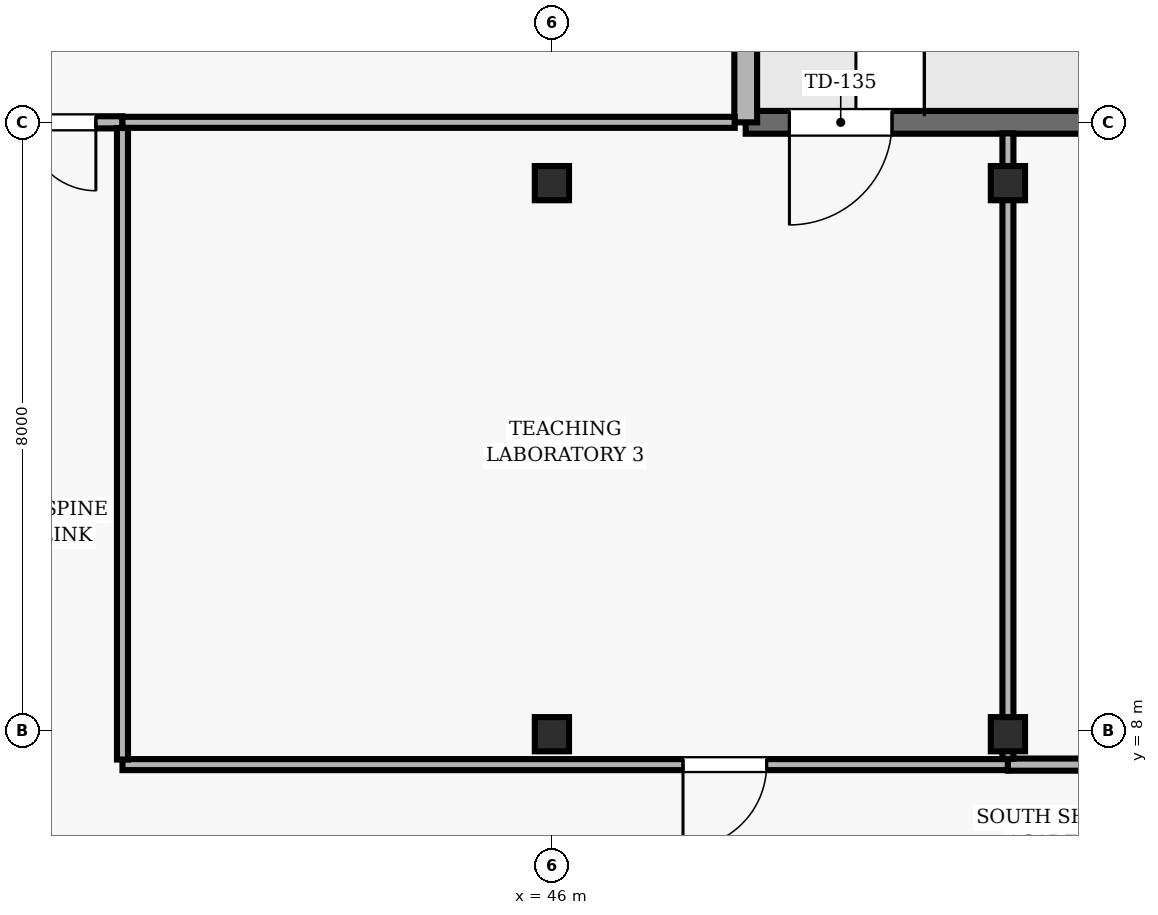
"""IFC4 building model, lengths in metres.
Left out: names, types, materials, properties, quantities, classifications, styles, units other than length and angle.
Written with IfcOpenShell. Run it as: python <this file> out.ifc"""

import sys

from ifc_helpers import new_model, si_unit, direction, frame, frame_2d, origin, origin_2d, place, context, subcontext, project, spatial, rectangle, hollow_rectangle, extrude, element, fill, save


model = new_model("IFC4")
c1 = context("Model", 3, precision=1e-05, world=origin(), true_north=direction((0.0, 1.0)))
c2 = subcontext(c1, "Body", "Model", "MODEL_VIEW")
j1 = project(units=[si_unit("LENGTHUNIT", "METRE"), si_unit("PLANEANGLEUNIT", "RADIAN")], contexts=[c1])
p1 = place(None, origin())
s1 = spatial("IfcSite", under=j1, at=p1, CompositionType="ELEMENT")
p2 = place(p1, origin())
s2 = spatial("IfcBuilding", under=s1, at=p2, CompositionType="ELEMENT")
p3 = place(p2, frame((0.0, 0.0, 187.5)))
s3 = spatial("IfcBuildingStorey", under=s2, at=p3, CompositionType="ELEMENT", Elevation=187.5)
for number, where, z_axis, x_axis in (
    (1, (46.0, 7.95, 0.0), (0.0, 0.0, 1.0), (1.0, 0.0, 0.0)),
    (2, (46.0, 15.2, 0.0), (0.0, 0.0, 1.0), (1.0, 0.0, 0.0)),
    (3, (52.0, 7.95, 0.0), (0.0, 0.0, 1.0), (1.0, 0.0, 0.0)),
    (4, (52.0, 15.2, 0.0), (0.0, 0.0, 1.0), (1.0, 0.0, 0.0)),
):
    element("IfcColumn", number, at=place(p3, frame(where, z_axis=z_axis, x_axis=x_axis)), inside=s3, PredefinedType="COLUMN", context=c2, shape_type="SweptSolid", body=[
        extrude(hollow_rectangle(XDim=0.45, YDim=0.45, WallThickness=0.02, at=origin_2d()), origin(), (0.0, 0.0, 1.0), 3.9),
    ])
p4 = place(p3, frame((62.7, 16.0, 0.0), z_axis=(0.0, 0.0, 1.0), x_axis=(-1.0, 0.0, 0.0)))
e5 = element("IfcWall", 5, at=p4, inside=s3, PredefinedType="SOLIDWALL", context=c2, shape_type="SweptSolid", body=[
    extrude(rectangle(XDim=14.15, YDim=0.3, at=frame_2d((7.075, 0.0))), origin(), (0.0, 0.0, 1.0), 3.69),
])
p5 = place(p4, frame((6.85, 0.0, 0.0)))
e6 = element("IfcOpeningElement", 6, at=p5, cuts=e5, PredefinedType="OPENING", context=c2, shape_type="SweptSolid", body=[
    extrude(rectangle(XDim=1.0, YDim=2.2, at=frame_2d((0.5, 1.1))), frame((0.0, 0.16, 0.0), z_axis=(0.0, -1.0, 0.0), x_axis=(1.0, 0.0, 0.0)), (0.0, 0.0, 1.0), 0.32),
])
p6 = place(p4, frame((12.225, 0.0, 0.0)))
e7 = element("IfcOpeningElement", 7, at=p6, cuts=e5, PredefinedType="OPENING", context=c2, shape_type="SweptSolid", body=[
    extrude(rectangle(XDim=1.35, YDim=2.2, at=frame_2d((0.675, 1.1))), frame((0.0, 0.16, 0.0), z_axis=(0.0, -1.0, 0.0), x_axis=(1.0, 0.0, 0.0)), (0.0, 0.0, 1.0), 0.32),
])
p7 = place(p4, frame((2.788, 0.0, 0.9)))
e8 = element("IfcOpeningElement", 8, at=p7, cuts=e5, PredefinedType="OPENING", context=c2, shape_type="SweptSolid", body=[
    extrude(rectangle(XDim=1.5, YDim=1.6, at=frame_2d((0.75, 0.8))), frame((0.0, 0.16, 0.0), z_axis=(0.0, -1.0, 0.0), x_axis=(1.0, 0.0, 0.0)), (0.0, 0.0, 1.0), 0.32),
])
p8 = place(p3, frame((48.55, 16.0, 0.0), z_axis=(0.0, 0.0, 1.0), x_axis=(0.0, 1.0, 0.0)))
e9 = element("IfcWall", 9, at=p8, inside=s3, PredefinedType="SOLIDWALL", context=c2, shape_type="SweptSolid", body=[
    extrude(rectangle(XDim=6.788, YDim=0.3, at=frame_2d((3.394, 0.0))), origin(), (0.0, 0.0, 1.0), 3.69),
])
p9 = place(p8, frame((2.494, 0.0, 0.9)))
e10 = element("IfcOpeningElement", 10, at=p9, cuts=e9, PredefinedType="OPENING", context=c2, shape_type="SweptSolid", body=[
    extrude(rectangle(XDim=1.8, YDim=1.6, at=frame_2d((0.9, 0.8))), frame((0.0, 0.16, 0.0), z_axis=(0.0, -1.0, 0.0), x_axis=(1.0, 0.0, 0.0)), (0.0, 0.0, 1.0), 0.32),
])
p10 = place(p3, frame((40.35, 16.0, 0.0), z_axis=(0.0, 0.0, 1.0), x_axis=(-1.0, 0.0, 0.0)))
e11 = element("IfcWall", 11, at=p10, inside=s3, PredefinedType="PARTITIONING", context=c2, shape_type="SweptSolid", body=[
    extrude(rectangle(XDim=2.3, YDim=0.16, at=frame_2d((1.15, 0.0))), origin(), (0.0, 0.0, 1.0), 3.69),
])
p11 = place(p10, frame((0.35, 0.0, 0.0)))
e12 = element("IfcOpeningElement", 12, at=p11, cuts=e11, PredefinedType="OPENING", context=c2, shape_type="SweptSolid", body=[
    extrude(rectangle(XDim=0.9, YDim=2.1, at=frame_2d((0.45, 1.05))), frame((0.0, 0.09, 0.0), z_axis=(0.0, -1.0, 0.0), x_axis=(1.0, 0.0, 0.0)), (0.0, 0.0, 1.0), 0.18),
])
p12 = place(p3, frame((40.35, 16.0, 0.0), z_axis=(0.0, 0.0, 1.0), x_axis=(1.0, 0.0, 0.0)))
e13 = element("IfcWall", 13, at=p12, inside=s3, PredefinedType="PARTITIONING", context=c2, shape_type="SweptSolid", body=[
    extrude(rectangle(XDim=8.055, YDim=0.145, at=frame_2d((4.027, 0.0))), origin(), (0.0, 0.0, 1.0), 3.39),
])
p13 = place(p3, frame((52.0, 7.55, 0.0), z_axis=(0.0, 0.0, 1.0), x_axis=(-1.0, 0.0, 0.0)))
e14 = element("IfcWall", 14, at=p13, inside=s3, PredefinedType="PARTITIONING", context=c2, shape_type="SweptSolid", body=[
    extrude(rectangle(XDim=11.65, YDim=0.145, at=frame_2d((5.825, 0.0))), origin(), (0.0, 0.0, 1.0), 3.146),
])
p14 = place(p13, frame((3.175, 0.0, 0.0)))
e15 = element("IfcOpeningElement", 15, at=p14, cuts=e14, PredefinedType="OPENING", context=c2, shape_type="SweptSolid", body=[
    extrude(rectangle(XDim=1.1, YDim=2.15, at=frame_2d((0.55, 1.075))), frame((0.0, 0.083, 0.0), z_axis=(0.0, -1.0, 0.0), x_axis=(1.0, 0.0, 0.0)), (0.0, 0.0, 1.0), 0.165),
])
p15 = place(p3, frame((65.055, 7.55, 0.0), z_axis=(0.0, 0.0, 1.0), x_axis=(-1.0, 0.0, 0.0)))
e16 = element("IfcWall", 16, at=p15, inside=s3, PredefinedType="PARTITIONING", context=c2, shape_type="SweptSolid", body=[
    extrude(rectangle(XDim=13.055, YDim=0.16, at=frame_2d((6.527, 0.0))), origin(), (0.0, 0.0, 1.0), 3.146),
])
p16 = place(p15, frame((4.678, 0.0, 0.0)))
e17 = element("IfcOpeningElement", 17, at=p16, cuts=e16, PredefinedType="OPENING", context=c2, shape_type="SweptSolid", body=[
    extrude(rectangle(XDim=0.9, YDim=2.1, at=frame_2d((0.45, 1.05))), frame((0.0, 0.09, 0.0), z_axis=(0.0, -1.0, 0.0), x_axis=(1.0, 0.0, 0.0)), (0.0, 0.0, 1.0), 0.18),
])
p17 = place(p3, frame((40.35, 7.617, 0.0), z_axis=(0.0, 0.0, 1.0), x_axis=(0.0, 1.0, 0.0)))
e18 = element("IfcWall", 18, at=p17, inside=s3, PredefinedType="PARTITIONING", context=c2, shape_type="SweptSolid", body=[
    extrude(rectangle(XDim=8.308, YDim=0.145, at=frame_2d((4.154, 0.0))), origin(), (0.0, 0.0, 1.0), 3.372),
])
p18 = place(p3, frame((52.0, 7.625, 0.0), z_axis=(0.0, 0.0, 1.0), x_axis=(0.0, 1.0, 0.0)))
e19 = element("IfcWall", 19, at=p18, inside=s3, PredefinedType="PARTITIONING", context=c2, shape_type="SweptSolid", body=[
    extrude(rectangle(XDim=8.23, YDim=0.145, at=frame_2d((4.115, 0.0))), origin(), (0.0, 0.0, 1.0), 3.146),
])
p19 = place(p6, origin())
e20 = element("IfcDoor", 20, at=p19, inside=s3, OperationType="SINGLE_SWING_RIGHT", PredefinedType="DOOR", context=c2, shape_type="SweptSolid", body=[
    extrude(rectangle(XDim=1.35, YDim=2.2, at=frame_2d((0.675, 1.1))), frame((0.0, 0.025, 0.0), z_axis=(0.0, -1.0, 0.0), x_axis=(1.0, 0.0, 0.0)), (0.0, 0.0, 1.0), 0.05),
])
fill(e7, e20)
p20 = place(p14, origin())
e21 = element("IfcDoor", 21, at=p20, inside=s3, OperationType="SINGLE_SWING_RIGHT", PredefinedType="DOOR", context=c2, shape_type="SweptSolid", body=[
    extrude(rectangle(XDim=1.1, YDim=2.15, at=frame_2d((0.55, 1.075))), frame((0.0, 0.025, 0.0), z_axis=(0.0, -1.0, 0.0), x_axis=(1.0, 0.0, 0.0)), (0.0, 0.0, 1.0), 0.05),
])
fill(e15, e21)
p21 = place(p11, origin())
e22 = element("IfcDoor", 22, at=p21, inside=s3, OperationType="SINGLE_SWING_LEFT", PredefinedType="DOOR", context=c2, shape_type="SweptSolid", body=[
    extrude(rectangle(XDim=0.9, YDim=2.1, at=frame_2d((0.45, 1.05))), frame((0.0, 0.025, 0.0), z_axis=(0.0, -1.0, 0.0), x_axis=(1.0, 0.0, 0.0)), (0.0, 0.0, 1.0), 0.05),
])
fill(e12, e22)
save(model, sys.argv[1])
